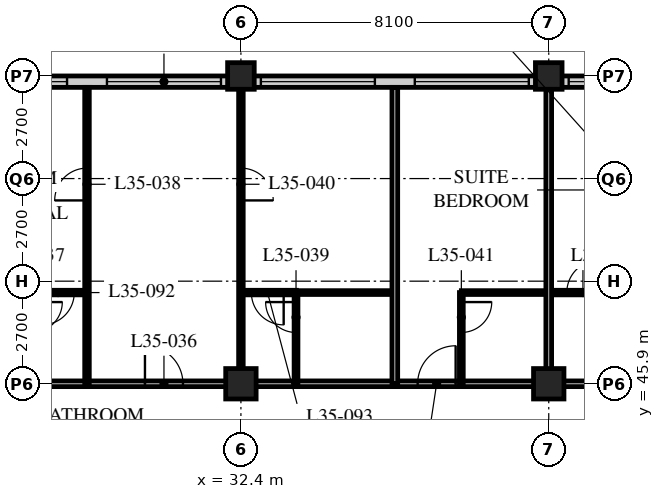
"""IFC4 building model, lengths in metres.
Left out: names, types, materials, properties, quantities, classifications, styles, units other than length and angle.
Written with IfcOpenShell. Run it as: python <this file> out.ifc"""

import sys

from ifc_helpers import new_model, si_unit, direction, frame, frame_2d, origin, origin_2d, place, context, subcontext, project, spatial, rectangle, hollow_rectangle, extrude, element, fill, save


model = new_model("IFC4")
c1 = context("Model", 3, precision=1e-05, world=origin(), true_north=direction((0.0, 1.0)))
c2 = subcontext(c1, "Body", "Model", "MODEL_VIEW")
j1 = project(units=[si_unit("LENGTHUNIT", "METRE"), si_unit("PLANEANGLEUNIT", "RADIAN")], contexts=[c1])
p1 = place(None, origin())
s1 = spatial("IfcSite", under=j1, at=p1, CompositionType="ELEMENT")
p2 = place(p1, origin())
s2 = spatial("IfcBuilding", under=s1, at=p2, CompositionType="ELEMENT")
p3 = place(p2, frame((0.0, 0.0, 137.4)))
s3 = spatial("IfcBuildingStorey", under=s2, at=p3, CompositionType="ELEMENT", Elevation=137.4)
p4 = place(p3, frame((32.4, 45.9, 0.0), z_axis=(0.0, 0.0, 1.0), x_axis=(1.0, 0.0, 0.0)))
e1 = element("IfcColumn", 1, at=p4, inside=s3, PredefinedType="COLUMN", context=c2, shape_type="SweptSolid", body=[
    extrude(hollow_rectangle(XDim=0.8, YDim=0.8, WallThickness=0.08, at=origin_2d()), origin(), (0.0, 0.0, 1.0), 3.4),
])
p5 = place(p3, frame((32.4, 54.0, 0.0), z_axis=(0.0, 0.0, 1.0), x_axis=(1.0, 0.0, 0.0)))
e2 = element("IfcColumn", 2, at=p5, inside=s3, PredefinedType="COLUMN", context=c2, shape_type="SweptSolid", body=[
    extrude(hollow_rectangle(XDim=0.7, YDim=0.7, WallThickness=0.07, at=origin_2d()), origin(), (0.0, 0.0, 1.0), 3.4),
])
p6 = place(p3, frame((40.5, 45.9, 0.0), z_axis=(0.0, 0.0, 1.0), x_axis=(1.0, 0.0, 0.0)))
e3 = element("IfcColumn", 3, at=p6, inside=s3, PredefinedType="COLUMN", context=c2, shape_type="SweptSolid", body=[
    extrude(hollow_rectangle(XDim=0.8, YDim=0.8, WallThickness=0.08, at=origin_2d()), origin(), (0.0, 0.0, 1.0), 3.4),
])
p7 = place(p3, frame((40.5, 54.0, 0.0), z_axis=(0.0, 0.0, 1.0), x_axis=(1.0, 0.0, 0.0)))
e4 = element("IfcColumn", 4, at=p7, inside=s3, PredefinedType="COLUMN", context=c2, shape_type="SweptSolid", body=[
    extrude(hollow_rectangle(XDim=0.7, YDim=0.7, WallThickness=0.07, at=origin_2d()), origin(), (0.0, 0.0, 1.0), 3.4),
])
p8 = place(p3, frame((48.3, 53.85, 0.0), z_axis=(0.0, 0.0, 1.0), x_axis=(-1.0, 0.0, 0.0)))
e5 = element("IfcWall", 5, at=p8, inside=s3, PredefinedType="SOLIDWALL", context=c2, shape_type="SweptSolid", body=[
    extrude(rectangle(XDim=40.2, YDim=0.3, at=frame_2d((20.1, 0.0))), origin(), (0.0, 0.0, 1.0), 3.19),
])
p9 = place(p8, frame((0.225, 0.0, 0.9)))
e6 = element("IfcOpeningElement", 6, at=p9, cuts=e5, PredefinedType="OPENING", context=c2, shape_type="SweptSolid", body=[
    extrude(rectangle(XDim=3.0, YDim=2.0, at=frame_2d((1.5, 1.0))), frame((0.0, 0.16, 0.0), z_axis=(0.0, -1.0, 0.0), x_axis=(1.0, 0.0, 0.0)), (0.0, 0.0, 1.0), 0.32),
])
p10 = place(p8, frame((4.275, 0.0, 0.9)))
e7 = element("IfcOpeningElement", 7, at=p10, cuts=e5, PredefinedType="OPENING", context=c2, shape_type="SweptSolid", body=[
    extrude(rectangle(XDim=3.0, YDim=2.0, at=frame_2d((1.5, 1.0))), frame((0.0, 0.16, 0.0), z_axis=(0.0, -1.0, 0.0), x_axis=(1.0, 0.0, 0.0)), (0.0, 0.0, 1.0), 0.32),
])
p11 = place(p8, frame((8.325, 0.0, 0.9)))
e8 = element("IfcOpeningElement", 8, at=p11, cuts=e5, PredefinedType="OPENING", context=c2, shape_type="SweptSolid", body=[
    extrude(rectangle(XDim=3.0, YDim=2.0, at=frame_2d((1.5, 1.0))), frame((0.0, 0.16, 0.0), z_axis=(0.0, -1.0, 0.0), x_axis=(1.0, 0.0, 0.0)), (0.0, 0.0, 1.0), 0.32),
])
p12 = place(p8, frame((12.375, 0.0, 0.9)))
e9 = element("IfcOpeningElement", 9, at=p12, cuts=e5, PredefinedType="OPENING", context=c2, shape_type="SweptSolid", body=[
    extrude(rectangle(XDim=3.0, YDim=2.0, at=frame_2d((1.5, 1.0))), frame((0.0, 0.16, 0.0), z_axis=(0.0, -1.0, 0.0), x_axis=(1.0, 0.0, 0.0)), (0.0, 0.0, 1.0), 0.32),
])
p13 = place(p8, frame((16.425, 0.0, 0.9)))
e10 = element("IfcOpeningElement", 10, at=p13, cuts=e5, PredefinedType="OPENING", context=c2, shape_type="SweptSolid", body=[
    extrude(rectangle(XDim=3.0, YDim=2.0, at=frame_2d((1.5, 1.0))), frame((0.0, 0.16, 0.0), z_axis=(0.0, -1.0, 0.0), x_axis=(1.0, 0.0, 0.0)), (0.0, 0.0, 1.0), 0.32),
])
p14 = place(p8, frame((20.475, 0.0, 0.9)))
e11 = element("IfcOpeningElement", 11, at=p14, cuts=e5, PredefinedType="OPENING", context=c2, shape_type="SweptSolid", body=[
    extrude(rectangle(XDim=3.0, YDim=2.0, at=frame_2d((1.5, 1.0))), frame((0.0, 0.16, 0.0), z_axis=(0.0, -1.0, 0.0), x_axis=(1.0, 0.0, 0.0)), (0.0, 0.0, 1.0), 0.32),
])
p15 = place(p8, frame((24.525, 0.0, 0.9)))
e12 = element("IfcOpeningElement", 12, at=p15, cuts=e5, PredefinedType="OPENING", context=c2, shape_type="SweptSolid", body=[
    extrude(rectangle(XDim=3.0, YDim=2.0, at=frame_2d((1.5, 1.0))), frame((0.0, 0.16, 0.0), z_axis=(0.0, -1.0, 0.0), x_axis=(1.0, 0.0, 0.0)), (0.0, 0.0, 1.0), 0.32),
])
p16 = place(p8, frame((28.575, 0.0, 0.9)))
e13 = element("IfcOpeningElement", 13, at=p16, cuts=e5, PredefinedType="OPENING", context=c2, shape_type="SweptSolid", body=[
    extrude(rectangle(XDim=3.0, YDim=2.0, at=frame_2d((1.5, 1.0))), frame((0.0, 0.16, 0.0), z_axis=(0.0, -1.0, 0.0), x_axis=(1.0, 0.0, 0.0)), (0.0, 0.0, 1.0), 0.32),
])
p17 = place(p8, frame((32.625, 0.0, 0.9)))
e14 = element("IfcOpeningElement", 14, at=p17, cuts=e5, PredefinedType="OPENING", context=c2, shape_type="SweptSolid", body=[
    extrude(rectangle(XDim=3.0, YDim=2.0, at=frame_2d((1.5, 1.0))), frame((0.0, 0.16, 0.0), z_axis=(0.0, -1.0, 0.0), x_axis=(1.0, 0.0, 0.0)), (0.0, 0.0, 1.0), 0.32),
])
p18 = place(p8, frame((36.675, 0.0, 0.9)))
e15 = element("IfcOpeningElement", 15, at=p18, cuts=e5, PredefinedType="OPENING", context=c2, shape_type="SweptSolid", body=[
    extrude(rectangle(XDim=3.0, YDim=2.0, at=frame_2d((1.5, 1.0))), frame((0.0, 0.16, 0.0), z_axis=(0.0, -1.0, 0.0), x_axis=(1.0, 0.0, 0.0)), (0.0, 0.0, 1.0), 0.32),
])
p19 = place(p3, frame((8.1, 45.9, 0.0), z_axis=(0.0, 0.0, 1.0), x_axis=(1.0, 0.0, 0.0)))
e16 = element("IfcWall", 16, at=p19, inside=s3, PredefinedType="PARTITIONING", context=c2, shape_type="SweptSolid", body=[
    extrude(rectangle(XDim=36.45, YDim=0.15, at=frame_2d((18.225, 0.0))), origin(), (0.0, 0.0, 1.0), 2.578),
])
p20 = place(p19, frame((9.625, 0.0, 0.0)))
e17 = element("IfcOpeningElement", 17, at=p20, cuts=e16, PredefinedType="OPENING", context=c2, shape_type="SweptSolid", body=[
    extrude(rectangle(XDim=1.0, YDim=2.1, at=frame_2d((0.5, 1.05))), frame((0.0, 0.085, 0.0), z_axis=(0.0, -1.0, 0.0), x_axis=(1.0, 0.0, 0.0)), (0.0, 0.0, 1.0), 0.17),
])
p21 = place(p19, frame((21.775, 0.0, 0.0)))
e18 = element("IfcOpeningElement", 18, at=p21, cuts=e16, PredefinedType="OPENING", context=c2, shape_type="SweptSolid", body=[
    extrude(rectangle(XDim=1.0, YDim=2.1, at=frame_2d((0.5, 1.05))), frame((0.0, 0.085, 0.0), z_axis=(0.0, -1.0, 0.0), x_axis=(1.0, 0.0, 0.0)), (0.0, 0.0, 1.0), 0.17),
])
p22 = place(p19, frame((28.95, 0.0, 0.0)))
e19 = element("IfcOpeningElement", 19, at=p22, cuts=e16, PredefinedType="OPENING", context=c2, shape_type="SweptSolid", body=[
    extrude(rectangle(XDim=1.0, YDim=2.1, at=frame_2d((0.5, 1.05))), frame((0.0, 0.085, 0.0), z_axis=(0.0, -1.0, 0.0), x_axis=(1.0, 0.0, 0.0)), (0.0, 0.0, 1.0), 0.17),
])
p23 = place(p19, frame((33.925, 0.0, 0.0)))
e20 = element("IfcOpeningElement", 20, at=p23, cuts=e16, PredefinedType="OPENING", context=c2, shape_type="SweptSolid", body=[
    extrude(rectangle(XDim=1.0, YDim=2.1, at=frame_2d((0.5, 1.05))), frame((0.0, 0.085, 0.0), z_axis=(0.0, -1.0, 0.0), x_axis=(1.0, 0.0, 0.0)), (0.0, 0.0, 1.0), 0.17),
])
p24 = place(p19, frame((2.625, 0.0, 0.0)))
e21 = element("IfcOpeningElement", 21, at=p24, cuts=e16, PredefinedType="OPENING", context=c2, shape_type="SweptSolid", body=[
    extrude(rectangle(XDim=1.0, YDim=2.1, at=frame_2d((0.5, 1.05))), frame((0.0, 0.085, 0.0), z_axis=(0.0, -1.0, 0.0), x_axis=(1.0, 0.0, 0.0)), (0.0, 0.0, 1.0), 0.17),
])
p25 = place(p3, frame((28.35, 45.9, 0.0), z_axis=(0.0, 0.0, 1.0), x_axis=(0.0, 1.0, 0.0)))
e22 = element("IfcWall", 22, at=p25, inside=s3, PredefinedType="PARTITIONING", context=c2, shape_type="SweptSolid", body=[
    extrude(rectangle(XDim=7.8, YDim=0.12, at=frame_2d((3.9, 0.0))), origin(), (0.0, 0.0, 1.0), 3.19),
])
p26 = place(p25, frame((4.825, 0.0, 0.0)))
e23 = element("IfcOpeningElement", 23, at=p26, cuts=e22, PredefinedType="OPENING", context=c2, shape_type="SweptSolid", body=[
    extrude(rectangle(XDim=0.85, YDim=2.1, at=frame_2d((0.425, 1.05))), frame((0.0, 0.07, 0.0), z_axis=(0.0, -1.0, 0.0), x_axis=(1.0, 0.0, 0.0)), (0.0, 0.0, 1.0), 0.14),
])
p27 = place(p3, frame((33.85, 48.3, 0.0), z_axis=(0.0, 0.0, 1.0), x_axis=(1.0, 0.0, 0.0)))
e24 = element("IfcWall", 24, at=p27, inside=s3, PredefinedType="PARTITIONING", context=c2, shape_type="SweptSolid", body=[
    extrude(rectangle(XDim=2.6, YDim=0.1, at=frame_2d((1.3, 0.0))), origin(), (0.0, 0.0, 1.0), 3.19),
])
p28 = place(p3, frame((33.85, 45.9, 0.0), z_axis=(0.0, 0.0, 1.0), x_axis=(0.0, 1.0, 0.0)))
e25 = element("IfcWall", 25, at=p28, inside=s3, PredefinedType="PARTITIONING", context=c2, shape_type="SweptSolid", body=[
    extrude(rectangle(XDim=2.4, YDim=0.1, at=frame_2d((1.2, 0.0))), origin(), (0.0, 0.0, 1.0), 3.19),
])
p29 = place(p28, frame((1.35, 0.0, 0.0)))
e26 = element("IfcOpeningElement", 26, at=p29, cuts=e25, PredefinedType="OPENING", context=c2, shape_type="SweptSolid", body=[
    extrude(rectangle(XDim=0.8, YDim=2.1, at=frame_2d((0.4, 1.05))), frame((0.0, 0.06, 0.0), z_axis=(0.0, -1.0, 0.0), x_axis=(1.0, 0.0, 0.0)), (0.0, 0.0, 1.0), 0.12),
])
p30 = place(p3, frame((32.4, 45.9, 0.0), z_axis=(0.0, 0.0, 1.0), x_axis=(0.0, 1.0, 0.0)))
e27 = element("IfcWall", 27, at=p30, inside=s3, PredefinedType="PARTITIONING", context=c2, shape_type="SweptSolid", body=[
    extrude(rectangle(XDim=7.8, YDim=0.12, at=frame_2d((3.9, 0.0))), origin(), (0.0, 0.0, 1.0), 2.578),
])
p31 = place(p30, frame((4.825, 0.0, 0.0)))
e28 = element("IfcOpeningElement", 28, at=p31, cuts=e27, PredefinedType="OPENING", context=c2, shape_type="SweptSolid", body=[
    extrude(rectangle(XDim=0.85, YDim=2.1, at=frame_2d((0.425, 1.05))), frame((0.0, 0.07, 0.0), z_axis=(0.0, -1.0, 0.0), x_axis=(1.0, 0.0, 0.0)), (0.0, 0.0, 1.0), 0.14),
])
p32 = place(p3, frame((36.45, 45.9, 0.0), z_axis=(0.0, 0.0, 1.0), x_axis=(0.0, 1.0, 0.0)))
e29 = element("IfcWall", 29, at=p32, inside=s3, PredefinedType="PARTITIONING", context=c2, shape_type="SweptSolid", body=[
    extrude(rectangle(XDim=7.8, YDim=0.15, at=frame_2d((3.9, 0.0))), origin(), (0.0, 0.0, 1.0), 3.19),
])
p33 = place(p3, frame((38.2, 48.3, 0.0), z_axis=(0.0, 0.0, 1.0), x_axis=(1.0, 0.0, 0.0)))
e30 = element("IfcWall", 30, at=p33, inside=s3, PredefinedType="PARTITIONING", context=c2, shape_type="SweptSolid", body=[
    extrude(rectangle(XDim=2.3, YDim=0.1, at=frame_2d((1.15, 0.0))), origin(), (0.0, 0.0, 1.0), 3.19),
])
p34 = place(p3, frame((38.2, 45.9, 0.0), z_axis=(0.0, 0.0, 1.0), x_axis=(0.0, 1.0, 0.0)))
e31 = element("IfcWall", 31, at=p34, inside=s3, PredefinedType="PARTITIONING", context=c2, shape_type="SweptSolid", body=[
    extrude(rectangle(XDim=2.4, YDim=0.1, at=frame_2d((1.2, 0.0))), origin(), (0.0, 0.0, 1.0), 3.19),
])
p35 = place(p34, frame((1.35, 0.0, 0.0)))
e32 = element("IfcOpeningElement", 32, at=p35, cuts=e31, PredefinedType="OPENING", context=c2, shape_type="SweptSolid", body=[
    extrude(rectangle(XDim=0.8, YDim=2.1, at=frame_2d((0.4, 1.05))), frame((0.0, 0.06, 0.0), z_axis=(0.0, -1.0, 0.0), x_axis=(1.0, 0.0, 0.0)), (0.0, 0.0, 1.0), 0.12),
])
p36 = place(p3, frame((40.5, 48.3, 0.0), z_axis=(0.0, 0.0, 1.0), x_axis=(1.0, 0.0, 0.0)))
e33 = element("IfcWall", 33, at=p36, inside=s3, PredefinedType="PARTITIONING", context=c2, shape_type="SweptSolid", body=[
    extrude(rectangle(XDim=8.05, YDim=0.12, at=frame_2d((4.025, 0.0))), origin(), (0.0, 0.0, 1.0), 3.19),
])
p37 = place(p36, frame((0.475, 0.0, 0.0)))
e34 = element("IfcOpeningElement", 34, at=p37, cuts=e33, PredefinedType="OPENING", context=c2, shape_type="SweptSolid", body=[
    extrude(rectangle(XDim=0.85, YDim=2.1, at=frame_2d((0.425, 1.05))), frame((0.0, 0.07, 0.0), z_axis=(0.0, -1.0, 0.0), x_axis=(1.0, 0.0, 0.0)), (0.0, 0.0, 1.0), 0.14),
])
p38 = place(p36, frame((4.325, 0.0, 0.0)))
e35 = element("IfcOpeningElement", 35, at=p38, cuts=e33, PredefinedType="OPENING", context=c2, shape_type="SweptSolid", body=[
    extrude(rectangle(XDim=0.85, YDim=2.1, at=frame_2d((0.425, 1.05))), frame((0.0, 0.07, 0.0), z_axis=(0.0, -1.0, 0.0), x_axis=(1.0, 0.0, 0.0)), (0.0, 0.0, 1.0), 0.14),
])
p39 = place(p3, frame((40.5, 45.9, 0.0), z_axis=(0.0, 0.0, 1.0), x_axis=(0.0, 1.0, 0.0)))
e36 = element("IfcWall", 36, at=p39, inside=s3, PredefinedType="PARTITIONING", context=c2, shape_type="SweptSolid", body=[
    extrude(rectangle(XDim=7.8, YDim=0.15, at=frame_2d((3.9, 0.0))), origin(), (0.0, 0.0, 1.0), 2.578),
])
p40 = place(p3, frame((26.89, 48.3, 0.0), z_axis=(0.0, 0.0, 1.0), x_axis=(1.0, 0.0, 0.0)))
e37 = element("IfcWall", 37, at=p40, inside=s3, PredefinedType="PARTITIONING", context=c2, shape_type="SweptSolid", body=[
    extrude(rectangle(XDim=1.46, YDim=0.12, at=frame_2d((0.73, 0.0))), origin(), (0.0, 0.0, 1.0), 3.19),
])
p41 = place(p40, frame((0.275, 0.0, 0.0)))
e38 = element("IfcOpeningElement", 38, at=p41, cuts=e37, PredefinedType="OPENING", context=c2, shape_type="SweptSolid", body=[
    extrude(rectangle(XDim=0.85, YDim=2.1, at=frame_2d((0.425, 1.05))), frame((0.0, 0.07, 0.0), z_axis=(0.0, -1.0, 0.0), x_axis=(1.0, 0.0, 0.0)), (0.0, 0.0, 1.0), 0.14),
])
p42 = place(p3, frame((32.4, 48.3, 0.0), z_axis=(0.0, 0.0, 1.0), x_axis=(1.0, 0.0, 0.0)))
e39 = element("IfcWall", 39, at=p42, inside=s3, PredefinedType="PARTITIONING", context=c2, shape_type="SweptSolid", body=[
    extrude(rectangle(XDim=1.46, YDim=0.12, at=frame_2d((0.73, 0.0))), origin(), (0.0, 0.0, 1.0), 3.19),
])
p43 = place(p42, frame((0.275, 0.0, 0.0)))
e40 = element("IfcOpeningElement", 40, at=p43, cuts=e39, PredefinedType="OPENING", context=c2, shape_type="SweptSolid", body=[
    extrude(rectangle(XDim=0.85, YDim=2.1, at=frame_2d((0.425, 1.05))), frame((0.0, 0.07, 0.0), z_axis=(0.0, -1.0, 0.0), x_axis=(1.0, 0.0, 0.0)), (0.0, 0.0, 1.0), 0.14),
])
p44 = place(p10, origin())
e41 = element("IfcWindow", 41, at=p44, inside=s3, PartitioningType="SINGLE_PANEL", PredefinedType="WINDOW", context=c2, shape_type="SweptSolid", body=[
    extrude(rectangle(XDim=3.0, YDim=2.0, at=frame_2d((1.5, 1.0))), frame((0.0, 0.03, 0.0), z_axis=(0.0, -1.0, 0.0), x_axis=(1.0, 0.0, 0.0)), (0.0, 0.0, 1.0), 0.06),
])
fill(e7, e41)
p45 = place(p11, origin())
e42 = element("IfcWindow", 42, at=p45, inside=s3, PartitioningType="SINGLE_PANEL", PredefinedType="WINDOW", context=c2, shape_type="SweptSolid", body=[
    extrude(rectangle(XDim=3.0, YDim=2.0, at=frame_2d((1.5, 1.0))), frame((0.0, 0.03, 0.0), z_axis=(0.0, -1.0, 0.0), x_axis=(1.0, 0.0, 0.0)), (0.0, 0.0, 1.0), 0.06),
])
fill(e8, e42)
p46 = place(p12, origin())
e43 = element("IfcWindow", 43, at=p46, inside=s3, PartitioningType="SINGLE_PANEL", PredefinedType="WINDOW", context=c2, shape_type="SweptSolid", body=[
    extrude(rectangle(XDim=3.0, YDim=2.0, at=frame_2d((1.5, 1.0))), frame((0.0, 0.03, 0.0), z_axis=(0.0, -1.0, 0.0), x_axis=(1.0, 0.0, 0.0)), (0.0, 0.0, 1.0), 0.06),
])
fill(e9, e43)
p47 = place(p13, origin())
e44 = element("IfcWindow", 44, at=p47, inside=s3, PartitioningType="SINGLE_PANEL", PredefinedType="WINDOW", context=c2, shape_type="SweptSolid", body=[
    extrude(rectangle(XDim=3.0, YDim=2.0, at=frame_2d((1.5, 1.0))), frame((0.0, 0.03, 0.0), z_axis=(0.0, -1.0, 0.0), x_axis=(1.0, 0.0, 0.0)), (0.0, 0.0, 1.0), 0.06),
])
fill(e10, e44)
p48 = place(p14, origin())
e45 = element("IfcWindow", 45, at=p48, inside=s3, PartitioningType="SINGLE_PANEL", PredefinedType="WINDOW", context=c2, shape_type="SweptSolid", body=[
    extrude(rectangle(XDim=3.0, YDim=2.0, at=frame_2d((1.5, 1.0))), frame((0.0, 0.03, 0.0), z_axis=(0.0, -1.0, 0.0), x_axis=(1.0, 0.0, 0.0)), (0.0, 0.0, 1.0), 0.06),
])
fill(e11, e45)
p49 = place(p21, origin())
e46 = element("IfcDoor", 46, at=p49, inside=s3, OperationType="SINGLE_SWING_LEFT", PredefinedType="DOOR", context=c2, shape_type="SweptSolid", body=[
    extrude(rectangle(XDim=1.0, YDim=2.1, at=frame_2d((0.5, 1.05))), frame((0.0, 0.025, 0.0), z_axis=(0.0, -1.0, 0.0), x_axis=(1.0, 0.0, 0.0)), (0.0, 0.0, 1.0), 0.05),
])
fill(e18, e46)
p50 = place(p26, origin())
e47 = element("IfcDoor", 47, at=p50, inside=s3, OperationType="SINGLE_SWING_LEFT", PredefinedType="DOOR", context=c2, shape_type="SweptSolid", body=[
    extrude(rectangle(XDim=0.85, YDim=2.1, at=frame_2d((0.425, 1.05))), frame((0.0, 0.025, 0.0), z_axis=(0.0, -1.0, 0.0), x_axis=(1.0, 0.0, 0.0)), (0.0, 0.0, 1.0), 0.05),
])
fill(e23, e47)
p51 = place(p29, origin())
e48 = element("IfcDoor", 48, at=p51, inside=s3, OperationType="SINGLE_SWING_RIGHT", PredefinedType="DOOR", context=c2, shape_type="SweptSolid", body=[
    extrude(rectangle(XDim=0.8, YDim=2.1, at=frame_2d((0.4, 1.05))), frame((0.0, 0.025, 0.0), z_axis=(0.0, -1.0, 0.0), x_axis=(1.0, 0.0, 0.0)), (0.0, 0.0, 1.0), 0.05),
])
fill(e26, e48)
p52 = place(p31, origin())
e49 = element("IfcDoor", 49, at=p52, inside=s3, OperationType="SINGLE_SWING_RIGHT", PredefinedType="DOOR", context=c2, shape_type="SweptSolid", body=[
    extrude(rectangle(XDim=0.85, YDim=2.1, at=frame_2d((0.425, 1.05))), frame((0.0, 0.025, 0.0), z_axis=(0.0, -1.0, 0.0), x_axis=(1.0, 0.0, 0.0)), (0.0, 0.0, 1.0), 0.05),
])
fill(e28, e49)
p53 = place(p35, origin())
e50 = element("IfcDoor", 50, at=p53, inside=s3, OperationType="SINGLE_SWING_LEFT", PredefinedType="DOOR", context=c2, shape_type="SweptSolid", body=[
    extrude(rectangle(XDim=0.8, YDim=2.1, at=frame_2d((0.4, 1.05))), frame((0.0, 0.025, 0.0), z_axis=(0.0, -1.0, 0.0), x_axis=(1.0, 0.0, 0.0)), (0.0, 0.0, 1.0), 0.05),
])
fill(e32, e50)
p54 = place(p22, origin())
e51 = element("IfcDoor", 51, at=p54, inside=s3, OperationType="SINGLE_SWING_RIGHT", PredefinedType="DOOR", context=c2, shape_type="SweptSolid", body=[
    extrude(rectangle(XDim=1.0, YDim=2.1, at=frame_2d((0.5, 1.05))), frame((0.0, 0.025, 0.0), z_axis=(0.0, -1.0, 0.0), x_axis=(1.0, 0.0, 0.0)), (0.0, 0.0, 1.0), 0.05),
])
fill(e19, e51)
p55 = place(p37, origin())
e52 = element("IfcDoor", 52, at=p55, inside=s3, OperationType="SINGLE_SWING_RIGHT", PredefinedType="DOOR", context=c2, shape_type="SweptSolid", body=[
    extrude(rectangle(XDim=0.85, YDim=2.1, at=frame_2d((0.425, 1.05))), frame((0.0, 0.025, 0.0), z_axis=(0.0, -1.0, 0.0), x_axis=(1.0, 0.0, 0.0)), (0.0, 0.0, 1.0), 0.05),
])
fill(e34, e52)
p56 = place(p41, origin())
e53 = element("IfcDoor", 53, at=p56, inside=s3, OperationType="SINGLE_SWING_RIGHT", PredefinedType="DOOR", context=c2, shape_type="SweptSolid", body=[
    extrude(rectangle(XDim=0.85, YDim=2.1, at=frame_2d((0.425, 1.05))), frame((0.0, 0.025, 0.0), z_axis=(0.0, -1.0, 0.0), x_axis=(1.0, 0.0, 0.0)), (0.0, 0.0, 1.0), 0.05),
])
fill(e38, e53)
p57 = place(p43, origin())
e54 = element("IfcDoor", 54, at=p57, inside=s3, OperationType="SINGLE_SWING_LEFT", PredefinedType="DOOR", context=c2, shape_type="SweptSolid", body=[
    extrude(rectangle(XDim=0.85, YDim=2.1, at=frame_2d((0.425, 1.05))), frame((0.0, 0.025, 0.0), z_axis=(0.0, -1.0, 0.0), x_axis=(1.0, 0.0, 0.0)), (0.0, 0.0, 1.0), 0.05),
])
fill(e40, e54)
save(model, sys.argv[1])
